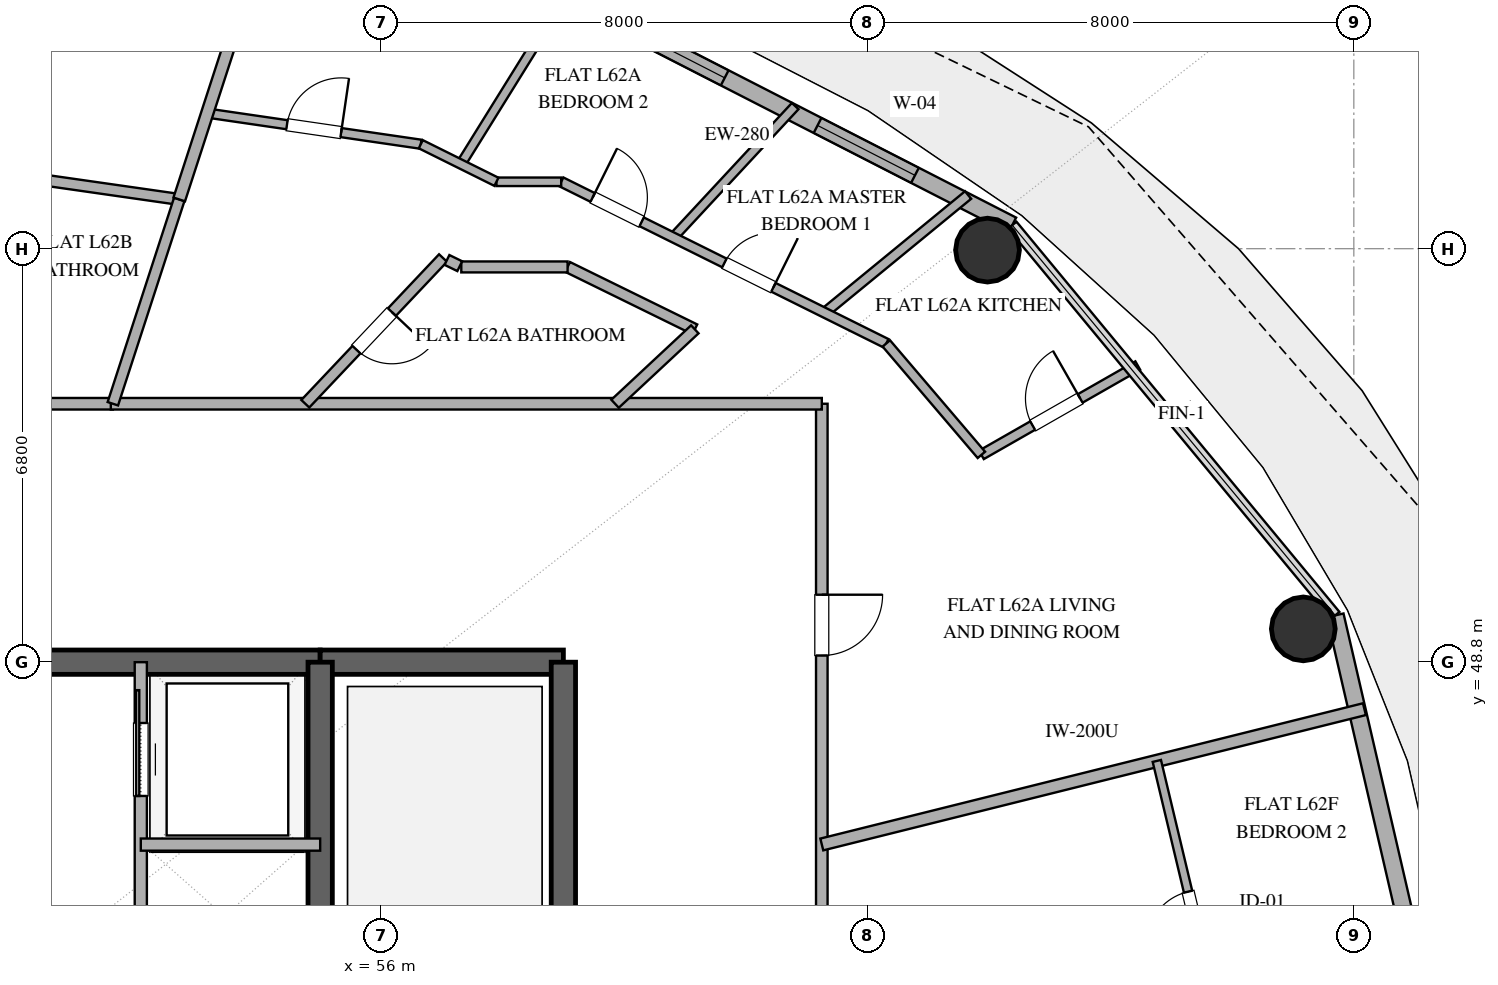
"""IFC4 building model, lengths in metres.
Left out: names, types, materials, properties, quantities, classifications, styles, units other than length and angle.
Written with IfcOpenShell. Run it as: python <this file> out.ifc"""

import sys

from ifc_helpers import new_model, si_unit, direction, frame, frame_2d, origin, origin_2d, place, context, subcontext, project, spatial, rectangle, hollow_circle, extrude, element, fill, save


model = new_model("IFC4")
c1 = context("Model", 3, precision=1e-05, world=origin(), true_north=direction((0.0, 1.0)))
c2 = subcontext(c1, "Body", "Model", "MODEL_VIEW")
j1 = project(units=[si_unit("LENGTHUNIT", "METRE"), si_unit("PLANEANGLEUNIT", "RADIAN")], contexts=[c1])
p1 = place(None, origin())
s1 = spatial("IfcSite", under=j1, at=p1, CompositionType="ELEMENT")
p2 = place(p1, origin())
s2 = spatial("IfcBuilding", under=s1, at=p2, CompositionType="ELEMENT")
p3 = place(p2, frame((0.0, 0.0, 242.4)))
s3 = spatial("IfcBuildingStorey", under=s2, at=p3, CompositionType="ELEMENT", Elevation=242.4)
p4 = place(p3, frame((41.0, 48.8, 0.0), z_axis=(0.0, 0.0, 1.0), x_axis=(1.0, 0.0, 0.0)))
e1 = element("IfcWall", 1, at=p4, inside=s3, PredefinedType="SHEAR", context=c2, shape_type="SweptSolid", body=[
    extrude(rectangle(XDim=14.0, YDim=0.4, at=frame_2d((7.0, 0.0))), origin(), (0.0, 0.0, 1.0), 3.36),
])
p5 = place(p4, frame((6.1, 0.0, 0.0)))
e2 = element("IfcOpeningElement", 2, at=p5, cuts=e1, PredefinedType="OPENING", context=c2, shape_type="SweptSolid", body=[
    extrude(rectangle(XDim=1.8, YDim=2.25, at=frame_2d((0.9, 1.125))), frame((0.0, 0.21, 0.0), z_axis=(0.0, -1.0, 0.0), x_axis=(1.0, 0.0, 0.0)), (0.0, 0.0, 1.0), 0.42),
])
p6 = place(p3, frame((55.0, 48.8, 0.0), z_axis=(0.0, 0.0, 1.0), x_axis=(1.0, 0.0, 0.0)))
e3 = element("IfcWall", 3, at=p6, inside=s3, PredefinedType="SHEAR", context=c2, shape_type="SweptSolid", body=[
    extrude(rectangle(XDim=4.0, YDim=0.4, at=frame_2d((2.0, 0.0))), origin(), (0.0, 0.0, 1.0), 3.36),
])
p7 = place(p3, frame((59.0, 35.2, 0.0), z_axis=(0.0, 0.0, 1.0), x_axis=(0.0, 1.0, 0.0)))
e4 = element("IfcWall", 4, at=p7, inside=s3, PredefinedType="SHEAR", context=c2, shape_type="SweptSolid", body=[
    extrude(rectangle(XDim=13.6, YDim=0.4, at=frame_2d((6.8, 0.0))), origin(), (0.0, 0.0, 1.0), 3.36),
])
p8 = place(p3, frame((55.0, 35.2, 0.0), z_axis=(0.0, 0.0, 1.0), x_axis=(0.0, 1.0, 0.0)))
e5 = element("IfcWall", 5, at=p8, inside=s3, PredefinedType="SHEAR", context=c2, shape_type="SweptSolid", body=[
    extrude(rectangle(XDim=13.6, YDim=0.4, at=frame_2d((6.8, 0.0))), origin(), (0.0, 0.0, 1.0), 3.36),
])
p9 = place(p8, frame((1.15, 0.0, 0.0)))
e6 = element("IfcOpeningElement", 6, at=p9, cuts=e5, PredefinedType="OPENING", context=c2, shape_type="SweptSolid", body=[
    extrude(rectangle(XDim=1.1, YDim=2.2, at=frame_2d((0.55, 1.1))), frame((0.0, 0.21, 0.0), z_axis=(0.0, -1.0, 0.0), x_axis=(1.0, 0.0, 0.0)), (0.0, 0.0, 1.0), 0.42),
])
for number, where, z_axis, x_axis in (
    (7, (71.169, 49.347, 0.0), (0.0, 0.0, 1.0), (1.0, 0.0, 0.0)),
    (8, (65.975, 55.576, 0.0), (0.0, 0.0, 1.0), (1.0, 0.0, 0.0)),
):
    element("IfcColumn", number, at=place(p3, frame(where, z_axis=z_axis, x_axis=x_axis)), inside=s3, PredefinedType="COLUMN", context=c2, shape_type="SweptSolid", body=[
        extrude(hollow_circle(Radius=0.525, WallThickness=0.028, at=origin_2d()), origin(), (0.0, 0.0, 1.0), 3.36),
    ])
p10 = place(p3, frame((73.447, 42.0, 0.0), z_axis=(0.0, 0.0, 1.0), x_axis=(-0.225635078214, 0.974211892495, 0.0)))
e9 = element("IfcWall", 9, at=p10, inside=s3, PredefinedType="SOLIDWALL", context=c2, shape_type="SweptSolid", body=[
    extrude(rectangle(XDim=7.77, YDim=0.28, at=frame_2d((3.885, 0.0))), origin(), (0.0, 0.0, 1.0), 3.36),
])
p11 = place(p10, frame((1.557, 0.0, 0.0)))
e10 = element("IfcOpeningElement", 10, at=p11, cuts=e9, PredefinedType="OPENING", context=c2, shape_type="SweptSolid", body=[
    extrude(rectangle(XDim=1.1, YDim=2.25, at=frame_2d((0.55, 1.125))), frame((0.0, 0.15, 0.0), z_axis=(0.0, -1.0, 0.0), x_axis=(1.0, 0.0, 0.0)), (0.0, 0.0, 1.0), 0.3),
])
p12 = place(p3, frame((66.383, 55.987, 0.0), z_axis=(0.0, 0.0, 1.0), x_axis=(-0.890007394051, 0.455946091699, 0.0)))
e11 = element("IfcWall", 11, at=p12, inside=s3, PredefinedType="SOLIDWALL", context=c2, shape_type="SweptSolid", body=[
    extrude(rectangle(XDim=9.404, YDim=0.28, at=frame_2d((4.702, 0.0))), origin(), (0.0, 0.0, 1.0), 3.36),
])
p13 = place(p12, frame((1.798, 0.0, 0.85)))
e12 = element("IfcOpeningElement", 12, at=p13, cuts=e11, PredefinedType="OPENING", context=c2, shape_type="SweptSolid", body=[
    extrude(rectangle(XDim=1.8, YDim=2.2, at=frame_2d((0.9, 1.1))), frame((0.0, 0.15, 0.0), z_axis=(0.0, -1.0, 0.0), x_axis=(1.0, 0.0, 0.0)), (0.0, 0.0, 1.0), 0.3),
])
p14 = place(p12, frame((5.314, 0.0, 0.85)))
e13 = element("IfcOpeningElement", 13, at=p14, cuts=e11, PredefinedType="OPENING", context=c2, shape_type="SweptSolid", body=[
    extrude(rectangle(XDim=1.65, YDim=2.0, at=frame_2d((0.825, 1.0))), frame((0.0, 0.15, 0.0), z_axis=(0.0, -1.0, 0.0), x_axis=(1.0, 0.0, 0.0)), (0.0, 0.0, 1.0), 0.3),
])
p15 = place(p3, frame((52.05, 38.4, 0.0), z_axis=(0.0, 0.0, 1.0), x_axis=(0.0, 1.0, 0.0)))
e14 = element("IfcWall", 14, at=p15, inside=s3, PredefinedType="SOLIDWALL", context=c2, shape_type="SweptSolid", body=[
    extrude(rectangle(XDim=10.4, YDim=0.2, at=frame_2d((5.2, 0.0))), origin(), (0.0, 0.0, 1.0), 2.72),
])
p16 = place(p15, frame((0.7, 0.0, 0.0)))
e15 = element("IfcOpeningElement", 15, at=p16, cuts=e14, PredefinedType="OPENING", context=c2, shape_type="SweptSolid", body=[
    extrude(rectangle(XDim=1.1, YDim=2.2, at=frame_2d((0.55, 1.1))), frame((0.0, 0.11, 0.0), z_axis=(0.0, -1.0, 0.0), x_axis=(1.0, 0.0, 0.0)), (0.0, 0.0, 1.0), 0.22),
])
p17 = place(p15, frame((8.2, 0.0, 0.0)))
e16 = element("IfcOpeningElement", 16, at=p17, cuts=e14, PredefinedType="OPENING", context=c2, shape_type="SweptSolid", body=[
    extrude(rectangle(XDim=1.2, YDim=2.2, at=frame_2d((0.6, 1.1))), frame((0.0, 0.11, 0.0), z_axis=(0.0, -1.0, 0.0), x_axis=(1.0, 0.0, 0.0)), (0.0, 0.0, 1.0), 0.22),
])
p18 = place(p3, frame((52.05, 45.8, 0.0), z_axis=(0.0, 0.0, 1.0), x_axis=(1.0, 0.0, 0.0)))
e17 = element("IfcWall", 17, at=p18, inside=s3, PredefinedType="SOLIDWALL", context=c2, shape_type="SweptSolid", body=[
    extrude(rectangle(XDim=2.95, YDim=0.2, at=frame_2d((1.475, 0.0))), origin(), (0.0, 0.0, 1.0), 2.72),
])
p19 = place(p3, frame((32.75, 53.05, 0.0), z_axis=(0.0, 0.0, 1.0), x_axis=(1.0, 0.0, 0.0)))
e18 = element("IfcWall", 18, at=p19, inside=s3, PredefinedType="PARTITIONING", context=c2, shape_type="SweptSolid", body=[
    extrude(rectangle(XDim=18.84, YDim=0.19, at=frame_2d((9.42, 0.0))), origin(), (0.0, 0.0, 1.0), 2.72),
])
p20 = place(p19, frame((11.305, 0.0, 0.0)))
e19 = element("IfcOpeningElement", 19, at=p20, cuts=e18, PredefinedType="OPENING", context=c2, shape_type="SweptSolid", body=[
    extrude(rectangle(XDim=1.0, YDim=2.2, at=frame_2d((0.5, 1.1))), frame((0.0, 0.105, 0.0), z_axis=(0.0, -1.0, 0.0), x_axis=(1.0, 0.0, 0.0)), (0.0, 0.0, 1.0), 0.21),
])
p21 = place(p19, frame((2.829, 0.0, 0.0)))
e20 = element("IfcOpeningElement", 20, at=p21, cuts=e18, PredefinedType="OPENING", context=c2, shape_type="SweptSolid", body=[
    extrude(rectangle(XDim=1.0, YDim=2.2, at=frame_2d((0.5, 1.1))), frame((0.0, 0.105, 0.0), z_axis=(0.0, -1.0, 0.0), x_axis=(1.0, 0.0, 0.0)), (0.0, 0.0, 1.0), 0.21),
])
p22 = place(p3, frame((63.25, 53.05, 0.0), z_axis=(0.0, 0.0, 1.0), x_axis=(0.0, -1.0, 0.0)))
e21 = element("IfcWall", 21, at=p22, inside=s3, PredefinedType="PARTITIONING", context=c2, shape_type="SweptSolid", body=[
    extrude(rectangle(XDim=16.335, YDim=0.19, at=frame_2d((8.167, 0.0))), origin(), (0.0, 0.0, 1.0), 2.72),
])
p23 = place(p22, frame((3.14, 0.0, 0.0)))
e22 = element("IfcOpeningElement", 22, at=p23, cuts=e21, PredefinedType="OPENING", context=c2, shape_type="SweptSolid", body=[
    extrude(rectangle(XDim=1.0, YDim=2.2, at=frame_2d((0.5, 1.1))), frame((0.0, 0.105, 0.0), z_axis=(0.0, -1.0, 0.0), x_axis=(1.0, 0.0, 0.0)), (0.0, 0.0, 1.0), 0.21),
])
p24 = place(p22, frame((10.111, 0.0, 0.0)))
e23 = element("IfcOpeningElement", 23, at=p24, cuts=e21, PredefinedType="OPENING", context=c2, shape_type="SweptSolid", body=[
    extrude(rectangle(XDim=1.0, YDim=2.2, at=frame_2d((0.5, 1.1))), frame((0.0, 0.105, 0.0), z_axis=(0.0, -1.0, 0.0), x_axis=(1.0, 0.0, 0.0)), (0.0, 0.0, 1.0), 0.21),
])
p25 = place(p3, frame((63.25, 45.802, 0.0), z_axis=(0.0, 0.0, 1.0), x_axis=(0.970293772743, 0.241929730659, 0.0)))
e24 = element("IfcWall", 24, at=p25, inside=s3, PredefinedType="PARTITIONING", context=c2, shape_type="SweptSolid", body=[
    extrude(rectangle(XDim=9.197, YDim=0.2, at=frame_2d((4.599, 0.0))), origin(), (0.0, 0.0, 1.0), 2.72),
])
p26 = place(p3, frame((69.996, 42.0, 0.0), z_axis=(0.0, 0.0, 1.0), x_axis=(-0.232321322639, 0.972639091877, 0.0)))
e25 = element("IfcWall", 25, at=p26, inside=s3, PredefinedType="PARTITIONING", context=c2, shape_type="SweptSolid", body=[
    extrude(rectangle(XDim=5.322, YDim=0.14, at=frame_2d((2.661, 0.0))), origin(), (0.0, 0.0, 1.0), 2.72),
])
p27 = place(p26, frame((2.211, 0.0, 0.0)))
e26 = element("IfcOpeningElement", 26, at=p27, cuts=e25, PredefinedType="OPENING", context=c2, shape_type="SweptSolid", body=[
    extrude(rectangle(XDim=0.9, YDim=2.1, at=frame_2d((0.45, 1.05))), frame((0.0, 0.08, 0.0), z_axis=(0.0, -1.0, 0.0), x_axis=(1.0, 0.0, 0.0)), (0.0, 0.0, 1.0), 0.16),
])
p28 = place(p3, frame((51.557, 53.05, 0.0), z_axis=(0.0, 0.0, 1.0), x_axis=(1.0, 0.0, 0.0)))
e27 = element("IfcWall", 27, at=p28, inside=s3, PredefinedType="PARTITIONING", context=c2, shape_type="SweptSolid", body=[
    extrude(rectangle(XDim=11.693, YDim=0.19, at=frame_2d((5.847, 0.0))), origin(), (0.0, 0.0, 1.0), 2.72),
])
p29 = place(p3, frame((48.859, 56.957, 0.0), z_axis=(0.0, 0.0, 1.0), x_axis=(0.989916598229, -0.141651433282, 0.0)))
e28 = element("IfcWall", 28, at=p29, inside=s3, PredefinedType="PLUMBINGWALL", context=c2, shape_type="SweptSolid", body=[
    extrude(rectangle(XDim=3.863, YDim=0.18, at=frame_2d((1.931, 0.0))), origin(), (0.0, 0.0, 1.0), 2.72),
])
p30 = place(p3, frame((53.144, 57.83, 0.0), z_axis=(0.0, 0.0, 1.0), x_axis=(0.98952683964, -0.144348999414, 0.0)))
e29 = element("IfcWall", 29, at=p30, inside=s3, PredefinedType="PARTITIONING", context=c2, shape_type="SweptSolid", body=[
    extrude(rectangle(XDim=3.548, YDim=0.15, at=frame_2d((1.774, 0.0))), origin(), (0.0, 0.0, 1.0), 2.72),
])
p31 = place(p30, frame((1.324, 0.0, 0.0)))
e30 = element("IfcOpeningElement", 30, at=p31, cuts=e29, PredefinedType="OPENING", context=c2, shape_type="SweptSolid", body=[
    extrude(rectangle(XDim=0.9, YDim=2.1, at=frame_2d((0.45, 1.05))), frame((0.0, 0.085, 0.0), z_axis=(0.0, -1.0, 0.0), x_axis=(1.0, 0.0, 0.0)), (0.0, 0.0, 1.0), 0.17),
])
p32 = place(p3, frame((52.682, 56.41, 0.0), z_axis=(0.0, 0.0, 1.0), x_axis=(-0.309025133622, -0.951053871655, 0.0)))
e31 = element("IfcWall", 31, at=p32, inside=s3, PredefinedType="PLUMBINGWALL", context=c2, shape_type="SweptSolid", body=[
    extrude(rectangle(XDim=3.533, YDim=0.18, at=frame_2d((1.767, 0.0))), origin(), (0.0, 0.0, 1.0), 2.72),
])
p33 = place(p3, frame((57.314, 56.99, 0.0), z_axis=(0.0, 0.0, 1.0), x_axis=(0.527732275503, 0.849410763643, 0.0)))
e32 = element("IfcWall", 32, at=p33, inside=s3, PredefinedType="PARTITIONING", context=c2, shape_type="SweptSolid", body=[
    extrude(rectangle(XDim=3.372, YDim=0.15, at=frame_2d((1.686, 0.0))), origin(), (0.0, 0.0, 1.0), 2.72),
])
p34 = place(p3, frame((54.165, 60.973, 0.0), z_axis=(0.0, 0.0, 1.0), x_axis=(-0.309012424199, -0.951058001223, 0.0)))
e33 = element("IfcWall", 33, at=p34, inside=s3, PredefinedType="PARTITIONING", context=c2, shape_type="SweptSolid", body=[
    extrude(rectangle(XDim=4.797, YDim=0.2, at=frame_2d((2.399, 0.0))), origin(), (0.0, 0.0, 1.0), 2.72),
])
p35 = place(p3, frame((57.021, 55.446, 0.0), z_axis=(0.0, 0.0, 1.0), x_axis=(-0.686947406922, -0.726707135044, 0.0)))
e34 = element("IfcWall", 34, at=p35, inside=s3, PredefinedType="PLUMBINGWALL", context=c2, shape_type="SweptSolid", body=[
    extrude(rectangle(XDim=3.297, YDim=0.18, at=frame_2d((1.649, 0.0))), origin(), (0.0, 0.0, 1.0), 2.72),
])
p36 = place(p35, frame((1.224, 0.0, 0.0)))
e35 = element("IfcOpeningElement", 35, at=p36, cuts=e34, PredefinedType="OPENING", context=c2, shape_type="SweptSolid", body=[
    extrude(rectangle(XDim=0.85, YDim=2.1, at=frame_2d((0.425, 1.05))), frame((0.0, 0.1, 0.0), z_axis=(0.0, -1.0, 0.0), x_axis=(1.0, 0.0, 0.0)), (0.0, 0.0, 1.0), 0.2),
])
p37 = place(p3, frame((63.296, 54.547, 0.0), z_axis=(0.0, 0.0, 1.0), x_axis=(0.773154828325, 0.634217321931, 0.0)))
e36 = element("IfcWall", 36, at=p37, inside=s3, PredefinedType="PLUMBINGWALL", context=c2, shape_type="SweptSolid", body=[
    extrude(rectangle(XDim=3.052, YDim=0.16, at=frame_2d((1.526, 0.0))), origin(), (0.0, 0.0, 1.0), 2.72),
])
p38 = place(p3, frame((65.875, 52.209, 0.0), z_axis=(0.0, 0.0, 1.0), x_axis=(0.868349640853, 0.495952519128, 0.0)))
e37 = element("IfcWall", 37, at=p38, inside=s3, PredefinedType="PLUMBINGWALL", context=c2, shape_type="SweptSolid", body=[
    extrude(rectangle(XDim=2.962, YDim=0.16, at=frame_2d((1.481, 0.0))), origin(), (0.0, 0.0, 1.0), 2.72),
])
p39 = place(p38, frame((0.971, 0.0, 0.0)))
e38 = element("IfcOpeningElement", 38, at=p39, cuts=e37, PredefinedType="OPENING", context=c2, shape_type="SweptSolid", body=[
    extrude(rectangle(XDim=0.9, YDim=2.1, at=frame_2d((0.45, 1.05))), frame((0.0, 0.09, 0.0), z_axis=(0.0, -1.0, 0.0), x_axis=(1.0, 0.0, 0.0)), (0.0, 0.0, 1.0), 0.18),
])
p40 = place(p3, frame((62.812, 57.945, 0.0), z_axis=(0.0, 0.0, 1.0), x_axis=(-0.680590804007, -0.732663741085, 0.0)))
e39 = element("IfcWall", 39, at=p40, inside=s3, PredefinedType="PARTITIONING", context=c2, shape_type="SweptSolid", body=[
    extrude(rectangle(XDim=2.949, YDim=0.15, at=frame_2d((1.475, 0.0))), origin(), (0.0, 0.0, 1.0), 2.72),
])
p41 = place(p3, frame((58.964, 56.7, 0.0), z_axis=(0.0, 0.0, 1.0), x_axis=(0.895471406875, -0.445119039661, 0.0)))
e40 = element("IfcWall", 40, at=p41, inside=s3, PredefinedType="PLUMBINGWALL", context=c2, shape_type="SweptSolid", body=[
    extrude(rectangle(XDim=5.971, YDim=0.16, at=frame_2d((2.986, 0.0))), origin(), (0.0, 0.0, 1.0), 2.72),
])
p42 = place(p41, frame((2.998, 0.0, 0.0)))
e41 = element("IfcOpeningElement", 41, at=p42, cuts=e40, PredefinedType="OPENING", context=c2, shape_type="SweptSolid", body=[
    extrude(rectangle(XDim=0.9, YDim=2.1, at=frame_2d((0.45, 1.05))), frame((0.0, 0.09, 0.0), z_axis=(0.0, -1.0, 0.0), x_axis=(1.0, 0.0, 0.0)), (0.0, 0.0, 1.0), 0.18),
])
p43 = place(p41, frame((0.578, 0.0, 0.0)))
e42 = element("IfcOpeningElement", 42, at=p43, cuts=e40, PredefinedType="OPENING", context=c2, shape_type="SweptSolid", body=[
    extrude(rectangle(XDim=0.9, YDim=2.1, at=frame_2d((0.45, 1.05))), frame((0.0, 0.09, 0.0), z_axis=(0.0, -1.0, 0.0), x_axis=(1.0, 0.0, 0.0)), (0.0, 0.0, 1.0), 0.18),
])
p44 = place(p3, frame((64.311, 54.042, 0.0), z_axis=(0.0, 0.0, 1.0), x_axis=(0.648953507232, -0.760828065631, 0.0)))
e43 = element("IfcWall", 43, at=p44, inside=s3, PredefinedType="PLUMBINGWALL", context=c2, shape_type="SweptSolid", body=[
    extrude(rectangle(XDim=2.409, YDim=0.16, at=frame_2d((1.205, 0.0))), origin(), (0.0, 0.0, 1.0), 2.72),
])
p45 = place(p3, frame((61.162, 54.273, 0.0), z_axis=(0.0, 0.0, 1.0), x_axis=(-0.897774561906, 0.440455259925, 0.0)))
e44 = element("IfcWall", 44, at=p45, inside=s3, PredefinedType="PLUMBINGWALL", context=c2, shape_type="SweptSolid", body=[
    extrude(rectangle(XDim=2.331, YDim=0.18, at=frame_2d((1.166, 0.0))), origin(), (0.0, 0.0, 1.0), 2.72),
])
p46 = place(p3, frame((59.85, 53.05, 0.0), z_axis=(0.0, 0.0, 1.0), x_axis=(0.731376514485, 0.681973895438, 0.0)))
e45 = element("IfcWall", 45, at=p46, inside=s3, PredefinedType="PLUMBINGWALL", context=c2, shape_type="SweptSolid", body=[
    extrude(rectangle(XDim=1.794, YDim=0.18, at=frame_2d((0.897, 0.0))), origin(), (0.0, 0.0, 1.0), 2.72),
])
p47 = place(p3, frame((59.069, 55.3, 0.0), z_axis=(0.0, 0.0, 1.0), x_axis=(-1.0, 0.0, 0.0)))
e46 = element("IfcWall", 46, at=p47, inside=s3, PredefinedType="PLUMBINGWALL", context=c2, shape_type="SweptSolid", body=[
    extrude(rectangle(XDim=1.748, YDim=0.18, at=frame_2d((0.874, 0.0))), origin(), (0.0, 0.0, 1.0), 2.72),
])
p48 = place(p3, frame((58.964, 56.7, 0.0), z_axis=(0.0, 0.0, 1.0), x_axis=(-1.0, 0.0, 0.0)))
e47 = element("IfcWall", 47, at=p48, inside=s3, PredefinedType="PARTITIONING", context=c2, shape_type="SweptSolid", body=[
    extrude(rectangle(XDim=1.065, YDim=0.14, at=frame_2d((0.533, 0.0))), origin(), (0.0, 0.0, 1.0), 2.72),
])
p49 = place(p3, frame((56.655, 57.318, 0.0), z_axis=(0.0, 0.0, 1.0), x_axis=(0.895584310315, -0.444891833053, 0.0)))
e48 = element("IfcWall", 48, at=p49, inside=s3, PredefinedType="PARTITIONING", context=c2, shape_type="SweptSolid", body=[
    extrude(rectangle(XDim=1.389, YDim=0.15, at=frame_2d((0.694, 0.0))), origin(), (0.0, 0.0, 1.0), 2.72),
])
p50 = place(p3, frame((57.296, 55.312, 0.0), z_axis=(0.0, 0.0, 1.0), x_axis=(-0.898768445644, 0.438423632021, 0.0)))
e49 = element("IfcWall", 49, at=p50, inside=s3, PredefinedType="PLUMBINGWALL", context=c2, shape_type="SweptSolid", body=[
    extrude(rectangle(XDim=0.234, YDim=0.18, at=frame_2d((0.117, 0.0))), origin(), (0.0, 0.0, 1.0), 2.72),
])
p51 = place(p13, origin())
e50 = element("IfcWindow", 50, at=p51, inside=s3, PartitioningType="SINGLE_PANEL", PredefinedType="WINDOW", context=c2, shape_type="SweptSolid", body=[
    extrude(rectangle(XDim=1.8, YDim=2.2, at=frame_2d((0.9, 1.1))), frame((0.0, 0.03, 0.0), z_axis=(0.0, -1.0, 0.0), x_axis=(1.0, 0.0, 0.0)), (0.0, 0.0, 1.0), 0.06),
])
fill(e12, e50)
p52 = place(p14, origin())
e51 = element("IfcWindow", 51, at=p52, inside=s3, PartitioningType="SINGLE_PANEL", PredefinedType="WINDOW", context=c2, shape_type="SweptSolid", body=[
    extrude(rectangle(XDim=1.65, YDim=2.0, at=frame_2d((0.825, 1.0))), frame((0.0, 0.03, 0.0), z_axis=(0.0, -1.0, 0.0), x_axis=(1.0, 0.0, 0.0)), (0.0, 0.0, 1.0), 0.06),
])
fill(e13, e51)
p53 = place(p17, origin())
e52 = element("IfcDoor", 52, at=p53, inside=s3, OperationType="SLIDING_TO_RIGHT", PredefinedType="DOOR", context=c2, shape_type="SweptSolid", body=[
    extrude(rectangle(XDim=1.2, YDim=2.2, at=frame_2d((0.6, 1.1))), frame((0.0, 0.025, 0.0), z_axis=(0.0, -1.0, 0.0), x_axis=(1.0, 0.0, 0.0)), (0.0, 0.0, 1.0), 0.05),
])
fill(e16, e52)
p54 = place(p23, origin())
e53 = element("IfcDoor", 53, at=p54, inside=s3, OperationType="SINGLE_SWING_LEFT", PredefinedType="DOOR", context=c2, shape_type="SweptSolid", body=[
    extrude(rectangle(XDim=1.0, YDim=2.2, at=frame_2d((0.5, 1.1))), frame((0.0, 0.025, 0.0), z_axis=(0.0, -1.0, 0.0), x_axis=(1.0, 0.0, 0.0)), (0.0, 0.0, 1.0), 0.05),
])
fill(e22, e53)
p55 = place(p27, origin())
e54 = element("IfcDoor", 54, at=p55, inside=s3, OperationType="SINGLE_SWING_LEFT", PredefinedType="DOOR", context=c2, shape_type="SweptSolid", body=[
    extrude(rectangle(XDim=0.9, YDim=2.1, at=frame_2d((0.45, 1.05))), frame((0.0, 0.025, 0.0), z_axis=(0.0, -1.0, 0.0), x_axis=(1.0, 0.0, 0.0)), (0.0, 0.0, 1.0), 0.05),
])
fill(e26, e54)
p56 = place(p31, origin())
e55 = element("IfcDoor", 55, at=p56, inside=s3, OperationType="SINGLE_SWING_RIGHT", PredefinedType="DOOR", context=c2, shape_type="SweptSolid", body=[
    extrude(rectangle(XDim=0.9, YDim=2.1, at=frame_2d((0.45, 1.05))), frame((0.0, 0.025, 0.0), z_axis=(0.0, -1.0, 0.0), x_axis=(1.0, 0.0, 0.0)), (0.0, 0.0, 1.0), 0.05),
])
fill(e30, e55)
p57 = place(p36, origin())
e56 = element("IfcDoor", 56, at=p57, inside=s3, OperationType="SINGLE_SWING_LEFT", PredefinedType="DOOR", context=c2, shape_type="SweptSolid", body=[
    extrude(rectangle(XDim=0.85, YDim=2.1, at=frame_2d((0.425, 1.05))), frame((0.0, 0.025, 0.0), z_axis=(0.0, -1.0, 0.0), x_axis=(1.0, 0.0, 0.0)), (0.0, 0.0, 1.0), 0.05),
])
fill(e35, e56)
p58 = place(p39, origin())
e57 = element("IfcDoor", 57, at=p58, inside=s3, OperationType="SINGLE_SWING_RIGHT", PredefinedType="DOOR", context=c2, shape_type="SweptSolid", body=[
    extrude(rectangle(XDim=0.9, YDim=2.1, at=frame_2d((0.45, 1.05))), frame((0.0, 0.025, 0.0), z_axis=(0.0, -1.0, 0.0), x_axis=(1.0, 0.0, 0.0)), (0.0, 0.0, 1.0), 0.05),
])
fill(e38, e57)
p59 = place(p42, origin())
e58 = element("IfcDoor", 58, at=p59, inside=s3, OperationType="SINGLE_SWING_RIGHT", PredefinedType="DOOR", context=c2, shape_type="SweptSolid", body=[
    extrude(rectangle(XDim=0.9, YDim=2.1, at=frame_2d((0.45, 1.05))), frame((0.0, 0.025, 0.0), z_axis=(0.0, -1.0, 0.0), x_axis=(1.0, 0.0, 0.0)), (0.0, 0.0, 1.0), 0.05),
])
fill(e41, e58)
p60 = place(p43, origin())
e59 = element("IfcDoor", 59, at=p60, inside=s3, OperationType="SINGLE_SWING_LEFT", PredefinedType="DOOR", context=c2, shape_type="SweptSolid", body=[
    extrude(rectangle(XDim=0.9, YDim=2.1, at=frame_2d((0.45, 1.05))), frame((0.0, 0.025, 0.0), z_axis=(0.0, -1.0, 0.0), x_axis=(1.0, 0.0, 0.0)), (0.0, 0.0, 1.0), 0.05),
])
fill(e42, e59)
save(model, sys.argv[1])
